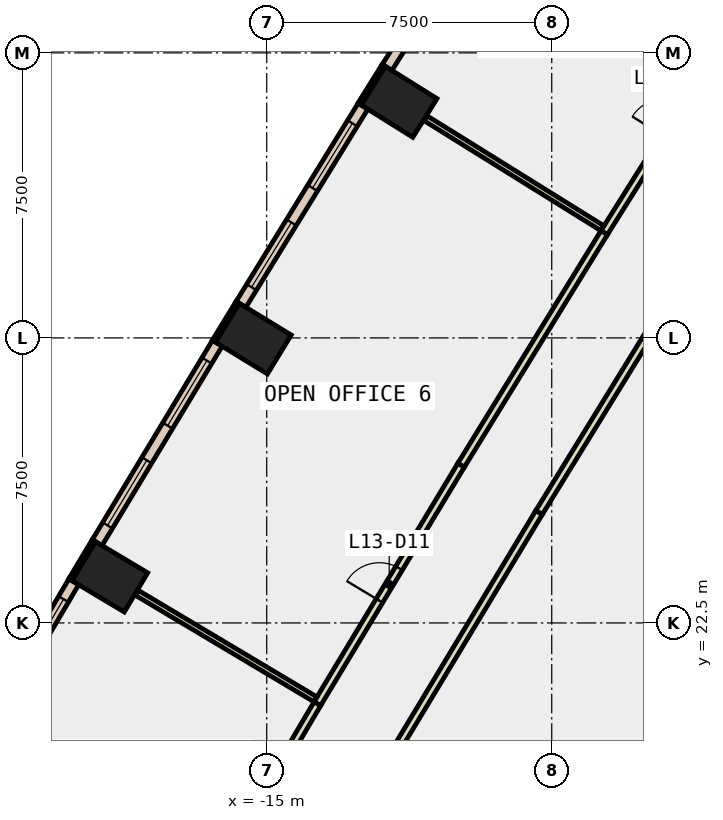
"""IFC4 building model, lengths in metres.
Left out: names, types, materials, properties, quantities, classifications, styles, units other than length and angle.
Written with IfcOpenShell. Run it as: python <this file> out.ifc"""

import sys

from ifc_helpers import new_model, si_unit, direction, frame, frame_2d, origin, origin_2d, place, context, subcontext, project, spatial, rectangle, extrude, element, fill, save


model = new_model("IFC4")
c1 = context("Model", 3, precision=1e-05, world=origin(), true_north=direction((0.0, 1.0)))
c2 = subcontext(c1, "Body", "Model", "MODEL_VIEW")
j1 = project(units=[si_unit("LENGTHUNIT", "METRE"), si_unit("PLANEANGLEUNIT", "RADIAN")], contexts=[c1])
p1 = place(None, origin())
s1 = spatial("IfcSite", under=j1, at=p1, CompositionType="ELEMENT")
p2 = place(p1, origin())
s2 = spatial("IfcBuilding", under=s1, at=p2, CompositionType="ELEMENT")
p3 = place(p2, frame((0.0, 0.0, 64.4)))
s3 = spatial("IfcBuildingStorey", under=s2, at=p3, CompositionType="ELEMENT", Elevation=64.4)
for number, where, z_axis, x_axis in (
    (1, (-11.516, 36.211, -0.4), (0.0, 0.0, 1.0), (0.53, 0.848, 0.0)),
    (2, (-15.351, 29.981, -0.4), (0.0, 0.0, 1.0), (0.522, 0.853, 0.0)),
    (3, (-19.127, 23.714, -0.4), (0.0, 0.0, 1.0), (0.513, 0.858, 0.0)),
):
    element("IfcColumn", number, at=place(p3, frame(where, z_axis=z_axis, x_axis=x_axis)), inside=s3, PredefinedType="COLUMN", context=c2, shape_type="SweptSolid", body=[
        extrude(rectangle(XDim=1.2, YDim=1.6, at=origin_2d()), origin(), (0.0, 0.0, 1.0), 4.2),
    ])
p4 = place(p3, frame((-11.919, 37.17, 0.0), z_axis=(0.0, 0.0, 1.0), x_axis=(-0.530273374944, -0.847826720401, 0.0)))
e4 = element("IfcWall", 4, at=p4, inside=s3, PredefinedType="STANDARD", context=c2, shape_type="SweptSolid", body=[
    extrude(rectangle(XDim=1.199, YDim=0.1, at=frame_2d((0.6, 0.0))), origin(), (0.0, 0.0, 1.0), 3.8),
])
for number, where, z_axis, x_axis in (
    (5, (-15.763, 30.936, 0.0), (0.0, 0.0, 1.0), (-0.522, -0.853, 0.0)),
    (6, (-19.549, 24.665, 0.0), (0.0, 0.0, 1.0), (-0.513, -0.858, 0.0)),
):
    element("IfcWall", number, at=place(p3, frame(where, z_axis=z_axis, x_axis=x_axis)), inside=s3, PredefinedType="STANDARD", context=c2, shape_type="SweptSolid", body=[
        extrude(rectangle(XDim=1.2, YDim=0.1, at=frame_2d((0.6, 0.0))), origin(), (0.0, 0.0, 1.0), 3.8),
    ])
p5 = place(p3, frame((-8.523, 42.38, 0.0), z_axis=(0.0, 0.0, 1.0), x_axis=(-0.532322705893, -0.846541515102, 0.0)))
e7 = element("IfcWall", 7, at=p5, inside=s3, PredefinedType="STANDARD", context=c2, shape_type="SweptSolid", body=[
    extrude(rectangle(XDim=6.218, YDim=0.3, at=frame_2d((3.109, 0.0))), origin(), (0.0, 0.0, 1.0), 3.8),
])
p6 = place(p5, frame((0.555, 0.0, 0.9)))
e8 = element("IfcOpeningElement", 8, at=p6, cuts=e7, PredefinedType="OPENING", context=c2, shape_type="SweptSolid", body=[
    extrude(rectangle(XDim=2.0, YDim=2.6, at=frame_2d((1.0, 1.3))), frame((0.0, 0.16, 0.0), z_axis=(0.0, -1.0, 0.0), x_axis=(1.0, 0.0, 0.0)), (0.0, 0.0, 1.0), 0.32),
])
p7 = place(p5, frame((3.664, 0.0, 0.9)))
e9 = element("IfcOpeningElement", 9, at=p7, cuts=e7, PredefinedType="OPENING", context=c2, shape_type="SweptSolid", body=[
    extrude(rectangle(XDim=2.0, YDim=2.6, at=frame_2d((1.0, 1.3))), frame((0.0, 0.16, 0.0), z_axis=(0.0, -1.0, 0.0), x_axis=(1.0, 0.0, 0.0)), (0.0, 0.0, 1.0), 0.32),
])
p8 = place(p3, frame((-12.466, 36.098, 0.0), z_axis=(0.0, 0.0, 1.0), x_axis=(-0.524239751329, -0.851570715282, 0.0)))
e10 = element("IfcWall", 10, at=p8, inside=s3, PredefinedType="STANDARD", context=c2, shape_type="SweptSolid", body=[
    extrude(rectangle(XDim=6.125, YDim=0.3, at=frame_2d((3.062, 0.0))), origin(), (0.0, 0.0, 1.0), 3.8),
])
p9 = place(p8, frame((0.531, 0.0, 0.9)))
e11 = element("IfcOpeningElement", 11, at=p9, cuts=e10, PredefinedType="OPENING", context=c2, shape_type="SweptSolid", body=[
    extrude(rectangle(XDim=2.0, YDim=2.6, at=frame_2d((1.0, 1.3))), frame((0.0, 0.16, 0.0), z_axis=(0.0, -1.0, 0.0), x_axis=(1.0, 0.0, 0.0)), (0.0, 0.0, 1.0), 0.32),
])
p10 = place(p8, frame((3.594, 0.0, 0.9)))
e12 = element("IfcOpeningElement", 12, at=p10, cuts=e10, PredefinedType="OPENING", context=c2, shape_type="SweptSolid", body=[
    extrude(rectangle(XDim=2.0, YDim=2.6, at=frame_2d((1.0, 1.3))), frame((0.0, 0.16, 0.0), z_axis=(0.0, -1.0, 0.0), x_axis=(1.0, 0.0, 0.0)), (0.0, 0.0, 1.0), 0.32),
])
p11 = place(p3, frame((-16.3, 29.859, 0.0), z_axis=(0.0, 0.0, 1.0), x_axis=(-0.516147563478, -0.856499674674, 0.0)))
e13 = element("IfcWall", 13, at=p11, inside=s3, PredefinedType="STANDARD", context=c2, shape_type="SweptSolid", body=[
    extrude(rectangle(XDim=6.126, YDim=0.3, at=frame_2d((3.063, 0.0))), origin(), (0.0, 0.0, 1.0), 3.8),
])
p12 = place(p11, frame((0.532, 0.0, 0.9)))
e14 = element("IfcOpeningElement", 14, at=p12, cuts=e13, PredefinedType="OPENING", context=c2, shape_type="SweptSolid", body=[
    extrude(rectangle(XDim=2.0, YDim=2.6, at=frame_2d((1.0, 1.3))), frame((0.0, 0.16, 0.0), z_axis=(0.0, -1.0, 0.0), x_axis=(1.0, 0.0, 0.0)), (0.0, 0.0, 1.0), 0.32),
])
p13 = place(p11, frame((3.595, 0.0, 0.9)))
e15 = element("IfcOpeningElement", 15, at=p13, cuts=e13, PredefinedType="OPENING", context=c2, shape_type="SweptSolid", body=[
    extrude(rectangle(XDim=2.0, YDim=2.6, at=frame_2d((1.0, 1.3))), frame((0.0, 0.16, 0.0), z_axis=(0.0, -1.0, 0.0), x_axis=(1.0, 0.0, 0.0)), (0.0, 0.0, 1.0), 0.32),
])
p14 = place(p3, frame((-20.076, 23.583, 0.0), z_axis=(0.0, 0.0, 1.0), x_axis=(-0.508163938648, -0.861260362177, 0.0)))
e16 = element("IfcWall", 16, at=p14, inside=s3, PredefinedType="STANDARD", context=c2, shape_type="SweptSolid", body=[
    extrude(rectangle(XDim=6.126, YDim=0.3, at=frame_2d((3.063, 0.0))), origin(), (0.0, 0.0, 1.0), 3.8),
])
p15 = place(p14, frame((0.531, 0.0, 0.9)))
e17 = element("IfcOpeningElement", 17, at=p15, cuts=e16, PredefinedType="OPENING", context=c2, shape_type="SweptSolid", body=[
    extrude(rectangle(XDim=2.0, YDim=2.6, at=frame_2d((1.0, 1.3))), frame((0.0, 0.16, 0.0), z_axis=(0.0, -1.0, 0.0), x_axis=(1.0, 0.0, 0.0)), (0.0, 0.0, 1.0), 0.32),
])
p16 = place(p14, frame((3.594, 0.0, 0.9)))
e18 = element("IfcOpeningElement", 18, at=p16, cuts=e16, PredefinedType="OPENING", context=c2, shape_type="SweptSolid", body=[
    extrude(rectangle(XDim=2.0, YDim=2.6, at=frame_2d((1.0, 1.3))), frame((0.0, 0.16, 0.0), z_axis=(0.0, -1.0, 0.0), x_axis=(1.0, 0.0, 0.0)), (0.0, 0.0, 1.0), 0.32),
])
p17 = place(p3, frame((-4.043, 31.564, 0.0), z_axis=(0.0, 0.0, 1.0), x_axis=(-0.524225471951, -0.851579505717, 0.0)))
e19 = element("IfcWall", 19, at=p17, inside=s3, PredefinedType="PARTITIONING", context=c2, shape_type="SweptSolid", body=[
    extrude(rectangle(XDim=7.233, YDim=0.2, at=frame_2d((3.617, 0.0))), origin(), (0.0, 0.0, 1.0), 3.8),
])
p18 = place(p3, frame((-7.835, 25.404, 0.0), z_axis=(0.0, 0.0, 1.0), x_axis=(-0.516172233954, -0.85648480716, 0.0)))
e20 = element("IfcWall", 20, at=p18, inside=s3, PredefinedType="PARTITIONING", context=c2, shape_type="SweptSolid", body=[
    extrude(rectangle(XDim=7.234, YDim=0.2, at=frame_2d((3.617, 0.0))), origin(), (0.0, 0.0, 1.0), 3.8),
])
p19 = place(p3, frame((-6.121, 32.768, 0.0), z_axis=(0.0, 0.0, 1.0), x_axis=(0.532309351336, 0.846549912574, 0.0)))
e21 = element("IfcWall", 21, at=p19, inside=s3, PredefinedType="PARTITIONING", context=c2, shape_type="SweptSolid", body=[
    extrude(rectangle(XDim=6.966, YDim=0.2, at=frame_2d((3.483, 0.0))), origin(), (0.0, 0.0, 1.0), 3.8),
])
p20 = place(p19, frame((2.983, 0.0, 0.0)))
e22 = element("IfcOpeningElement", 22, at=p20, cuts=e21, PredefinedType="OPENING", context=c2, shape_type="SweptSolid", body=[
    extrude(rectangle(XDim=1.0, YDim=2.1, at=frame_2d((0.5, 1.05))), frame((0.0, 0.11, 0.0), z_axis=(0.0, -1.0, 0.0), x_axis=(1.0, 0.0, 0.0)), (0.0, 0.0, 1.0), 0.22),
])
p21 = place(p3, frame((-13.669, 20.373, 0.0), z_axis=(0.0, 0.0, 1.0), x_axis=(0.516247820136, 0.85643924957, 0.0)))
e23 = element("IfcWall", 23, at=p21, inside=s3, PredefinedType="PARTITIONING", context=c2, shape_type="SweptSolid", body=[
    extrude(rectangle(XDim=7.332, YDim=0.2, at=frame_2d((3.666, 0.0))), origin(), (0.0, 0.0, 1.0), 3.8),
])
p22 = place(p21, frame((3.166, 0.0, 0.0)))
e24 = element("IfcOpeningElement", 24, at=p22, cuts=e23, PredefinedType="OPENING", context=c2, shape_type="SweptSolid", body=[
    extrude(rectangle(XDim=1.0, YDim=2.1, at=frame_2d((0.5, 1.05))), frame((0.0, 0.11, 0.0), z_axis=(0.0, -1.0, 0.0), x_axis=(1.0, 0.0, 0.0)), (0.0, 0.0, 1.0), 0.22),
])
p23 = place(p3, frame((-9.884, 26.652, 0.0), z_axis=(0.0, 0.0, 1.0), x_axis=(0.524182788618, 0.851605779758, 0.0)))
e25 = element("IfcWall", 25, at=p23, inside=s3, PredefinedType="PARTITIONING", context=c2, shape_type="SweptSolid", body=[
    extrude(rectangle(XDim=7.18, YDim=0.2, at=frame_2d((3.59, 0.0))), origin(), (0.0, 0.0, 1.0), 3.8),
])
p24 = place(p3, frame((-17.357, 14.122, 0.0), z_axis=(0.0, 0.0, 1.0), x_axis=(0.508298575594, 0.861180909014, 0.0)))
e26 = element("IfcWall", 26, at=p24, inside=s3, PredefinedType="PARTITIONING", context=c2, shape_type="SweptSolid", body=[
    extrude(rectangle(XDim=7.258, YDim=0.2, at=frame_2d((3.629, 0.0))), origin(), (0.0, 0.0, 1.0), 3.8),
])
p25 = place(p24, frame((3.204, 0.0, 0.0)))
e27 = element("IfcOpeningElement", 27, at=p25, cuts=e26, PredefinedType="OPENING", context=c2, shape_type="SweptSolid", body=[
    extrude(rectangle(XDim=1.0, YDim=2.1, at=frame_2d((0.5, 1.05))), frame((0.0, 0.11, 0.0), z_axis=(0.0, -1.0, 0.0), x_axis=(1.0, 0.0, 0.0)), (0.0, 0.0, 1.0), 0.22),
])
p26 = place(p3, frame((-6.166, 32.885, 0.0), z_axis=(0.0, 0.0, 1.0), x_axis=(-0.84915518202, 0.528143424506, 0.0)))
e28 = element("IfcWall", 28, at=p26, inside=s3, PredefinedType="PARTITIONING", context=c2, shape_type="SweptSolid", body=[
    extrude(rectangle(XDim=5.48, YDim=0.15, at=frame_2d((2.74, 0.0))), origin(), (0.0, 0.0, 1.0), 3.8),
])
p27 = place(p3, frame((-13.716, 20.488, 0.0), z_axis=(0.0, 0.0, 1.0), x_axis=(-0.85883841868, 0.512246591594, 0.0)))
e29 = element("IfcWall", 29, at=p27, inside=s3, PredefinedType="PARTITIONING", context=c2, shape_type="SweptSolid", body=[
    extrude(rectangle(XDim=5.479, YDim=0.15, at=frame_2d((2.74, 0.0))), origin(), (0.0, 0.0, 1.0), 3.8),
])
p28 = place(p9, origin())
e30 = element("IfcWindow", 30, at=p28, inside=s3, PartitioningType="SINGLE_PANEL", PredefinedType="WINDOW", context=c2, shape_type="SweptSolid", body=[
    extrude(rectangle(XDim=2.0, YDim=2.6, at=frame_2d((1.0, 1.3))), frame((0.0, 0.03, 0.0), z_axis=(0.0, -1.0, 0.0), x_axis=(1.0, 0.0, 0.0)), (0.0, 0.0, 1.0), 0.06),
])
fill(e11, e30)
p29 = place(p10, origin())
e31 = element("IfcWindow", 31, at=p29, inside=s3, PartitioningType="SINGLE_PANEL", PredefinedType="WINDOW", context=c2, shape_type="SweptSolid", body=[
    extrude(rectangle(XDim=2.0, YDim=2.6, at=frame_2d((1.0, 1.3))), frame((0.0, 0.03, 0.0), z_axis=(0.0, -1.0, 0.0), x_axis=(1.0, 0.0, 0.0)), (0.0, 0.0, 1.0), 0.06),
])
fill(e12, e31)
p30 = place(p12, origin())
e32 = element("IfcWindow", 32, at=p30, inside=s3, PartitioningType="SINGLE_PANEL", PredefinedType="WINDOW", context=c2, shape_type="SweptSolid", body=[
    extrude(rectangle(XDim=2.0, YDim=2.6, at=frame_2d((1.0, 1.3))), frame((0.0, 0.03, 0.0), z_axis=(0.0, -1.0, 0.0), x_axis=(1.0, 0.0, 0.0)), (0.0, 0.0, 1.0), 0.06),
])
fill(e14, e32)
p31 = place(p13, origin())
e33 = element("IfcWindow", 33, at=p31, inside=s3, PartitioningType="SINGLE_PANEL", PredefinedType="WINDOW", context=c2, shape_type="SweptSolid", body=[
    extrude(rectangle(XDim=2.0, YDim=2.6, at=frame_2d((1.0, 1.3))), frame((0.0, 0.03, 0.0), z_axis=(0.0, -1.0, 0.0), x_axis=(1.0, 0.0, 0.0)), (0.0, 0.0, 1.0), 0.06),
])
fill(e15, e33)
p32 = place(p15, origin())
e34 = element("IfcWindow", 34, at=p32, inside=s3, PartitioningType="SINGLE_PANEL", PredefinedType="WINDOW", context=c2, shape_type="SweptSolid", body=[
    extrude(rectangle(XDim=2.0, YDim=2.6, at=frame_2d((1.0, 1.3))), frame((0.0, 0.03, 0.0), z_axis=(0.0, -1.0, 0.0), x_axis=(1.0, 0.0, 0.0)), (0.0, 0.0, 1.0), 0.06),
])
fill(e17, e34)
p33 = place(p22, origin())
e35 = element("IfcDoor", 35, at=p33, inside=s3, OperationType="SINGLE_SWING_LEFT", PredefinedType="DOOR", context=c2, shape_type="SweptSolid", body=[
    extrude(rectangle(XDim=1.0, YDim=2.1, at=frame_2d((0.5, 1.05))), frame((0.0, 0.025, 0.0), z_axis=(0.0, -1.0, 0.0), x_axis=(1.0, 0.0, 0.0)), (0.0, 0.0, 1.0), 0.05),
])
fill(e24, e35)
save(model, sys.argv[1])
